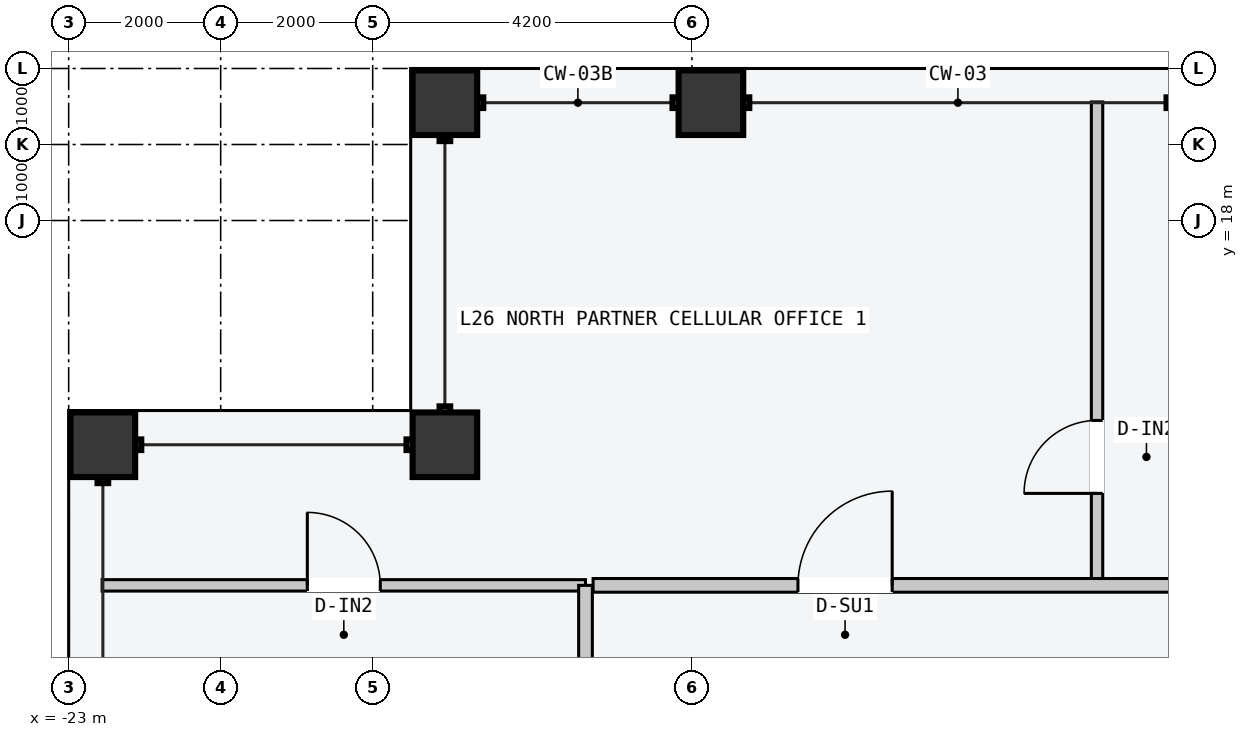
"""IFC4 building model, lengths in metres.
Left out: names, types, materials, properties, quantities, classifications, styles, units other than length and angle.
Written with IfcOpenShell. Run it as: python <this file> out.ifc"""

import sys

from ifc_helpers import new_model, si_unit, direction, frame, frame_2d, origin, origin_2d, place, context, subcontext, project, spatial, rectangle, hollow_rectangle, extrude, element, fill, save


model = new_model("IFC4")
c1 = context("Model", 3, precision=1e-05, world=origin(), true_north=direction((0.0, 1.0)))
c2 = subcontext(c1, "Body", "Model", "MODEL_VIEW")
j1 = project(units=[si_unit("LENGTHUNIT", "METRE"), si_unit("PLANEANGLEUNIT", "RADIAN")], contexts=[c1])
p1 = place(None, origin())
s1 = spatial("IfcSite", under=j1, at=p1, CompositionType="ELEMENT")
p2 = place(p1, origin())
s2 = spatial("IfcBuilding", under=s1, at=p2, CompositionType="ELEMENT")
p3 = place(p2, frame((0.0, 0.0, 102.6)))
s3 = spatial("IfcBuildingStorey", under=s2, at=p3, CompositionType="ELEMENT", Elevation=102.6)
for number, where, z_axis, x_axis in (
    (1, (-18.05, 19.55, 0.0), (0.0, 0.0, 1.0), (1.0, 0.0, 0.0)),
    (2, (-14.55, 19.55, 0.0), (0.0, 0.0, 1.0), (1.0, 0.0, 0.0)),
    (3, (-22.55, 15.05, 0.0), (0.0, 0.0, 1.0), (0.0, 1.0, 0.0)),
    (4, (-18.05, 15.05, 0.0), (0.0, 0.0, 1.0), (1.0, 0.0, 0.0)),
):
    element("IfcColumn", number, at=place(p3, frame(where, z_axis=z_axis, x_axis=x_axis)), inside=s3, PredefinedType="COLUMN", context=c2, shape_type="SweptSolid", body=[
        extrude(hollow_rectangle(XDim=0.85, YDim=0.85, WallThickness=0.04, at=origin_2d()), origin(), (0.0, 0.0, 1.0), 3.6),
    ])
p4 = place(p3, frame((-9.469, 13.26, 0.0), z_axis=(0.0, 0.0, 1.0), x_axis=(0.0, 1.0, 0.0)))
e5 = element("IfcWall", 5, at=p4, inside=s3, PredefinedType="PARTITIONING", context=c2, shape_type="SweptSolid", body=[
    extrude(rectangle(XDim=6.3, YDim=0.15, at=frame_2d((3.15, 0.0))), origin(), (0.0, 0.0, 1.0), 3.4),
])
p5 = place(p4, frame((1.15, 0.0, 0.0)))
e6 = element("IfcOpeningElement", 6, at=p5, cuts=e5, PredefinedType="OPENING", context=c2, shape_type="SweptSolid", body=[
    extrude(rectangle(XDim=0.96, YDim=2.18, at=frame_2d((0.48, 1.09))), frame((0.0, 0.085, 0.0), z_axis=(0.0, -1.0, 0.0), x_axis=(1.0, 0.0, 0.0)), (0.0, 0.0, 1.0), 0.17),
])
p6 = place(p3, frame((-16.1, 13.2, 0.0), z_axis=(0.0, 0.0, 1.0), x_axis=(1.0, 0.0, 0.0)))
e7 = element("IfcWall", 7, at=p6, inside=s3, PredefinedType="PARTITIONING", context=c2, shape_type="SweptSolid", body=[
    extrude(rectangle(XDim=32.2, YDim=0.18, at=frame_2d((16.1, 0.0))), origin(), (0.0, 0.0, 1.0), 3.4),
])
p7 = place(p6, frame((2.695, 0.0, 0.0)))
e8 = element("IfcOpeningElement", 8, at=p7, cuts=e7, PredefinedType="OPENING", context=c2, shape_type="SweptSolid", body=[
    extrude(rectangle(XDim=1.24, YDim=2.24, at=frame_2d((0.62, 1.12))), frame((0.0, 0.1, 0.0), z_axis=(0.0, -1.0, 0.0), x_axis=(1.0, 0.0, 0.0)), (0.0, 0.0, 1.0), 0.2),
])
p8 = place(p6, frame((11.511, 0.0, 0.0)))
e9 = element("IfcOpeningElement", 9, at=p8, cuts=e7, PredefinedType="OPENING", context=c2, shape_type="SweptSolid", body=[
    extrude(rectangle(XDim=1.4, YDim=2.2, at=frame_2d((0.7, 1.1))), frame((0.0, 0.1, 0.0), z_axis=(0.0, -1.0, 0.0), x_axis=(1.0, 0.0, 0.0)), (0.0, 0.0, 1.0), 0.2),
])
p9 = place(p6, frame((20.892, 0.0, 0.0)))
e10 = element("IfcOpeningElement", 10, at=p9, cuts=e7, PredefinedType="OPENING", context=c2, shape_type="SweptSolid", body=[
    extrude(rectangle(XDim=0.9, YDim=2.15, at=frame_2d((0.45, 1.075))), frame((0.0, 0.1, 0.0), z_axis=(0.0, -1.0, 0.0), x_axis=(1.0, 0.0, 0.0)), (0.0, 0.0, 1.0), 0.2),
])
p10 = place(p6, frame((28.067, 0.0, 0.0)))
e11 = element("IfcOpeningElement", 11, at=p10, cuts=e7, PredefinedType="OPENING", context=c2, shape_type="SweptSolid", body=[
    extrude(rectangle(XDim=0.96, YDim=2.18, at=frame_2d((0.48, 1.09))), frame((0.0, 0.1, 0.0), z_axis=(0.0, -1.0, 0.0), x_axis=(1.0, 0.0, 0.0)), (0.0, 0.0, 1.0), 0.2),
])
p11 = place(p3, frame((-22.56, 13.2, 0.0), z_axis=(0.0, 0.0, 1.0), x_axis=(1.0, 0.0, 0.0)))
e12 = element("IfcWall", 12, at=p11, inside=s3, PredefinedType="PARTITIONING", context=c2, shape_type="SweptSolid", body=[
    extrude(rectangle(XDim=6.36, YDim=0.15, at=frame_2d((3.18, 0.0))), origin(), (0.0, 0.0, 1.0), 3.4),
])
p12 = place(p11, frame((2.7, 0.0, 0.0)))
e13 = element("IfcOpeningElement", 13, at=p12, cuts=e12, PredefinedType="OPENING", context=c2, shape_type="SweptSolid", body=[
    extrude(rectangle(XDim=0.96, YDim=2.18, at=frame_2d((0.48, 1.09))), frame((0.0, 0.085, 0.0), z_axis=(0.0, -1.0, 0.0), x_axis=(1.0, 0.0, 0.0)), (0.0, 0.0, 1.0), 0.17),
])
p13 = place(p3, frame((-16.2, 11.25, 0.0), z_axis=(0.0, 0.0, 1.0), x_axis=(0.0, 1.0, 0.0)))
e14 = element("IfcWall", 14, at=p13, inside=s3, PredefinedType="PARTITIONING", context=c2, shape_type="SweptSolid", body=[
    extrude(rectangle(XDim=1.95, YDim=0.18, at=frame_2d((0.975, 0.0))), origin(), (0.0, 0.0, 1.0), 3.4),
])
p14 = place(p5, origin())
e15 = element("IfcDoor", 15, at=p14, inside=s3, OperationType="SINGLE_SWING_LEFT", PredefinedType="DOOR", context=c2, shape_type="SweptSolid", body=[
    extrude(rectangle(XDim=0.96, YDim=2.18, at=frame_2d((0.48, 1.09))), frame((0.0, 0.025, 0.0), z_axis=(0.0, -1.0, 0.0), x_axis=(1.0, 0.0, 0.0)), (0.0, 0.0, 1.0), 0.05),
])
fill(e6, e15)
p15 = place(p7, origin())
e16 = element("IfcDoor", 16, at=p15, inside=s3, OperationType="SINGLE_SWING_RIGHT", PredefinedType="DOOR", context=c2, shape_type="SweptSolid", body=[
    extrude(rectangle(XDim=1.24, YDim=2.24, at=frame_2d((0.62, 1.12))), frame((0.0, 0.025, 0.0), z_axis=(0.0, -1.0, 0.0), x_axis=(1.0, 0.0, 0.0)), (0.0, 0.0, 1.0), 0.05),
])
fill(e8, e16)
p16 = place(p12, origin())
e17 = element("IfcDoor", 17, at=p16, inside=s3, OperationType="SINGLE_SWING_LEFT", PredefinedType="DOOR", context=c2, shape_type="SweptSolid", body=[
    extrude(rectangle(XDim=0.96, YDim=2.18, at=frame_2d((0.48, 1.09))), frame((0.0, 0.025, 0.0), z_axis=(0.0, -1.0, 0.0), x_axis=(1.0, 0.0, 0.0)), (0.0, 0.0, 1.0), 0.05),
])
fill(e13, e17)
save(model, sys.argv[1])
